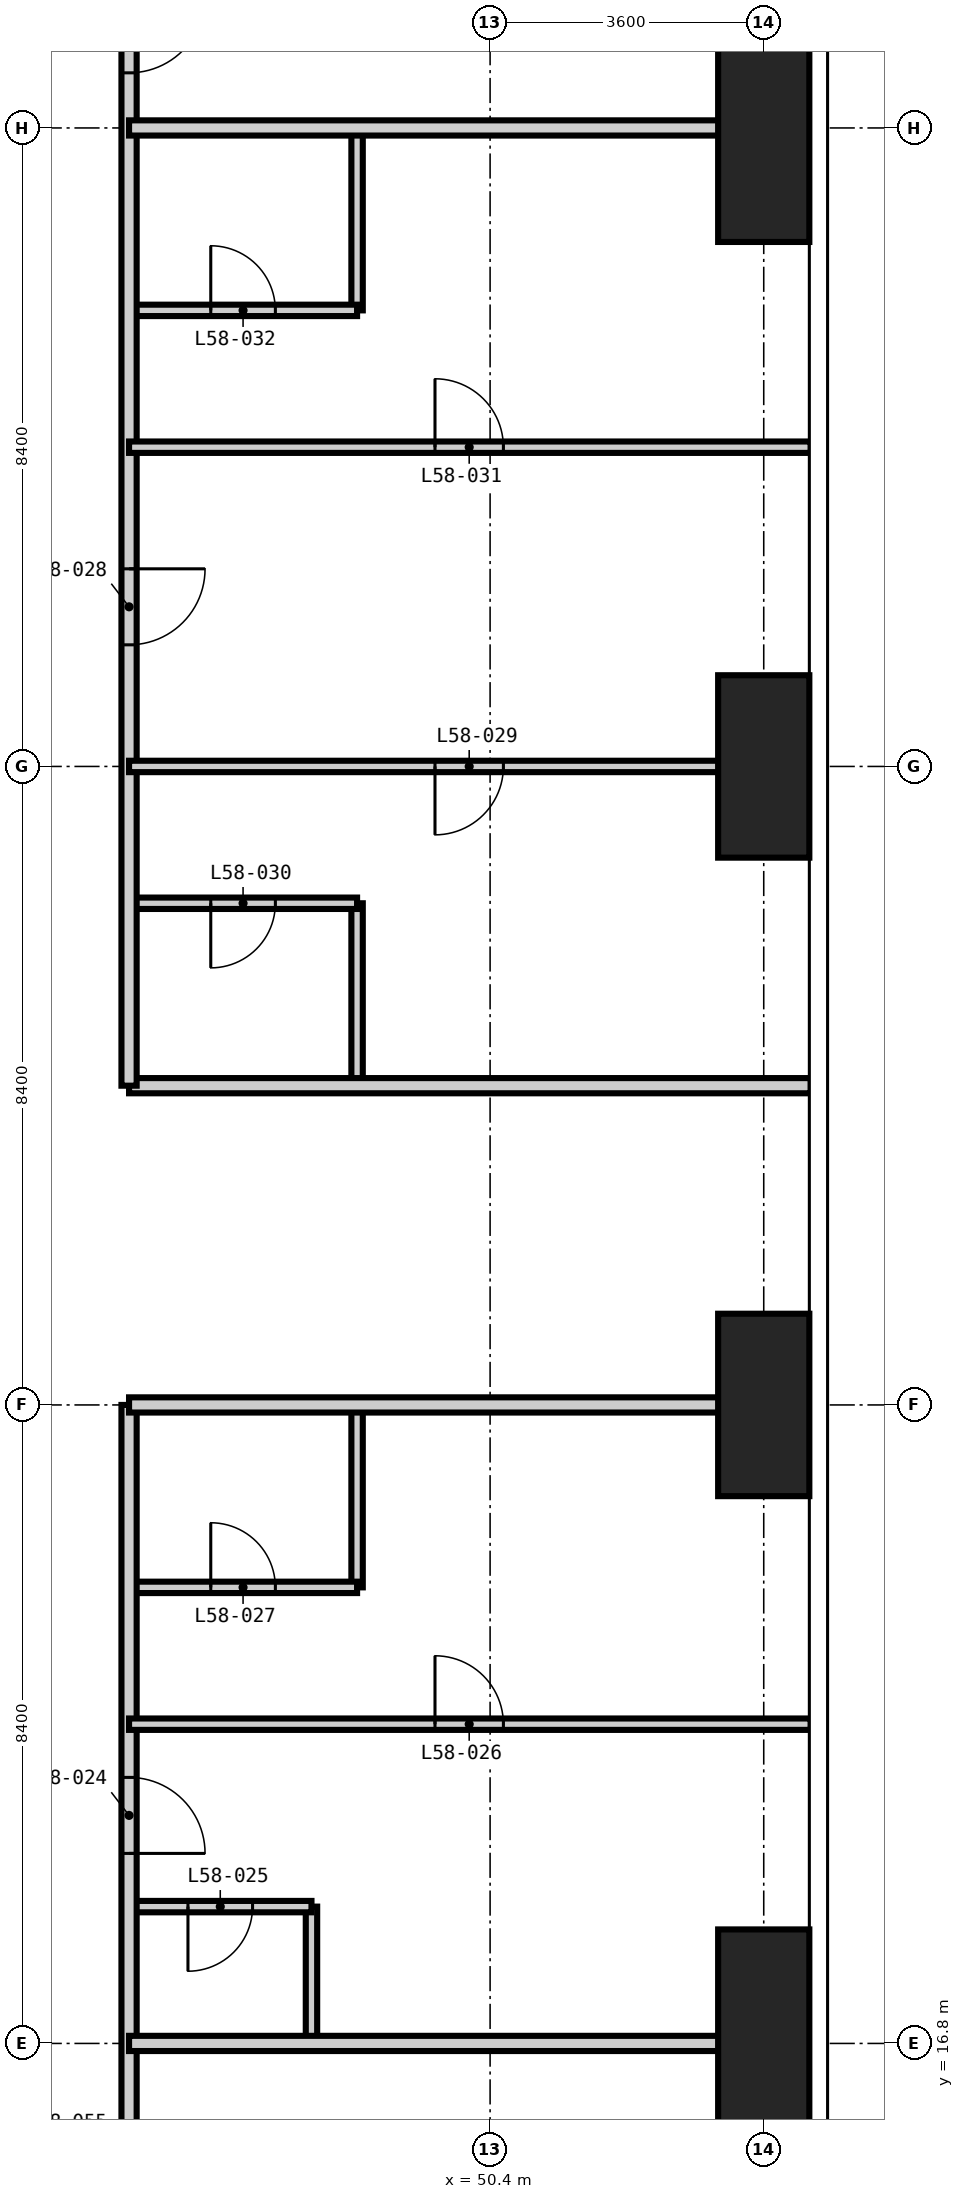
"""IFC4 building model, lengths in metres.
Left out: names, types, materials, properties, quantities, classifications, styles, units other than length and angle.
Written with IfcOpenShell. Run it as: python <this file> out.ifc"""

import sys

from ifc_helpers import new_model, si_unit, direction, frame, frame_2d, origin, origin_2d, place, context, subcontext, project, spatial, rectangle, extrude, element, fill, save


model = new_model("IFC4")
c1 = context("Model", 3, precision=1e-05, world=origin(), true_north=direction((0.0, 1.0)))
c2 = subcontext(c1, "Body", "Model", "MODEL_VIEW")
j1 = project(units=[si_unit("LENGTHUNIT", "METRE"), si_unit("PLANEANGLEUNIT", "RADIAN")], contexts=[c1])
p1 = place(None, origin())
s1 = spatial("IfcSite", under=j1, at=p1, CompositionType="ELEMENT")
p2 = place(p1, origin())
s2 = spatial("IfcBuilding", under=s1, at=p2, CompositionType="ELEMENT")
p3 = place(p2, frame((0.0, 0.0, 225.6)))
s3 = spatial("IfcBuildingStorey", under=s2, at=p3, CompositionType="ELEMENT", Elevation=225.6)
p4 = place(p3, frame((54.0, 16.8, -0.35), z_axis=(0.0, 0.0, 1.0), x_axis=(1.0, 0.0, 0.0)))
e1 = element("IfcColumn", 1, at=p4, inside=s3, PredefinedType="COLUMN", context=c2, shape_type="SweptSolid", body=[
    extrude(rectangle(XDim=1.2, YDim=3.0, at=origin_2d()), origin(), (0.0, 0.0, 1.0), 3.9),
])
for number, where, z_axis, x_axis in (
    (2, (54.0, 25.2, -0.35), (0.0, 0.0, 1.0), (1.0, 0.0, 0.0)),
    (3, (54.0, 33.6, -0.35), (0.0, 0.0, 1.0), (1.0, 0.0, 0.0)),
):
    element("IfcColumn", number, at=place(p3, frame(where, z_axis=z_axis, x_axis=x_axis)), inside=s3, PredefinedType="COLUMN", context=c2, shape_type="SweptSolid", body=[
        extrude(rectangle(XDim=1.2, YDim=2.4, at=origin_2d()), origin(), (0.0, 0.0, 1.0), 3.9),
    ])
p5 = place(p3, frame((54.0, 42.0, -0.35), z_axis=(0.0, 0.0, 1.0), x_axis=(1.0, 0.0, 0.0)))
e4 = element("IfcColumn", 4, at=p5, inside=s3, PredefinedType="COLUMN", context=c2, shape_type="SweptSolid", body=[
    extrude(rectangle(XDim=1.2, YDim=3.0, at=origin_2d()), origin(), (0.0, 0.0, 1.0), 3.9),
])
p6 = place(p3, frame((48.05, 16.8, 0.0), z_axis=(0.0, 0.0, 1.0), x_axis=(0.0, 1.0, 0.0)))
e5 = element("IfcWall", 5, at=p6, inside=s3, PredefinedType="PARTITIONING", context=c2, shape_type="SweptSolid", body=[
    extrude(rectangle(XDim=1.8, YDim=0.15, at=frame_2d((0.9, 0.0))), origin(), (0.0, 0.0, 1.0), 3.55),
])
p7 = place(p3, frame((48.65, 22.8, 0.0), z_axis=(0.0, 0.0, 1.0), x_axis=(0.0, 1.0, 0.0)))
e6 = element("IfcWall", 6, at=p7, inside=s3, PredefinedType="PARTITIONING", context=c2, shape_type="SweptSolid", body=[
    extrude(rectangle(XDim=2.4, YDim=0.15, at=frame_2d((1.2, 0.0))), origin(), (0.0, 0.0, 1.0), 3.55),
])
p8 = place(p3, frame((48.65, 29.4, 0.0), z_axis=(0.0, 0.0, 1.0), x_axis=(0.0, 1.0, 0.0)))
e7 = element("IfcWall", 7, at=p8, inside=s3, PredefinedType="PARTITIONING", context=c2, shape_type="SweptSolid", body=[
    extrude(rectangle(XDim=2.4, YDim=0.15, at=frame_2d((1.2, 0.0))), origin(), (0.0, 0.0, 1.0), 3.55),
])
p9 = place(p3, frame((48.65, 39.6, 0.0), z_axis=(0.0, 0.0, 1.0), x_axis=(0.0, 1.0, 0.0)))
e8 = element("IfcWall", 8, at=p9, inside=s3, PredefinedType="PARTITIONING", context=c2, shape_type="SweptSolid", body=[
    extrude(rectangle(XDim=2.4, YDim=0.15, at=frame_2d((1.2, 0.0))), origin(), (0.0, 0.0, 1.0), 3.55),
])
p10 = place(p3, frame((45.65, 18.6, 0.0), z_axis=(0.0, 0.0, 1.0), x_axis=(1.0, 0.0, 0.0)))
e9 = element("IfcWall", 9, at=p10, inside=s3, PredefinedType="PARTITIONING", context=c2, shape_type="SweptSolid", body=[
    extrude(rectangle(XDim=2.4, YDim=0.15, at=frame_2d((1.2, 0.0))), origin(), (0.0, 0.0, 1.0), 3.55),
])
p11 = place(p10, frame((0.775, 0.0, 0.0)))
e10 = element("IfcOpeningElement", 10, at=p11, cuts=e9, PredefinedType="OPENING", context=c2, shape_type="SweptSolid", body=[
    extrude(rectangle(XDim=0.85, YDim=2.1, at=frame_2d((0.425, 1.05))), frame((0.0, 0.085, 0.0), z_axis=(0.0, -1.0, 0.0), x_axis=(1.0, 0.0, 0.0)), (0.0, 0.0, 1.0), 0.17),
])
p12 = place(p3, frame((45.65, 22.8, 0.0), z_axis=(0.0, 0.0, 1.0), x_axis=(1.0, 0.0, 0.0)))
e11 = element("IfcWall", 11, at=p12, inside=s3, PredefinedType="PARTITIONING", context=c2, shape_type="SweptSolid", body=[
    extrude(rectangle(XDim=3.0, YDim=0.15, at=frame_2d((1.5, 0.0))), origin(), (0.0, 0.0, 1.0), 3.55),
])
p13 = place(p12, frame((1.075, 0.0, 0.0)))
e12 = element("IfcOpeningElement", 12, at=p13, cuts=e11, PredefinedType="OPENING", context=c2, shape_type="SweptSolid", body=[
    extrude(rectangle(XDim=0.85, YDim=2.1, at=frame_2d((0.425, 1.05))), frame((0.0, 0.085, 0.0), z_axis=(0.0, -1.0, 0.0), x_axis=(1.0, 0.0, 0.0)), (0.0, 0.0, 1.0), 0.17),
])
p14 = place(p3, frame((45.65, 31.8, 0.0), z_axis=(0.0, 0.0, 1.0), x_axis=(1.0, 0.0, 0.0)))
e13 = element("IfcWall", 13, at=p14, inside=s3, PredefinedType="PARTITIONING", context=c2, shape_type="SweptSolid", body=[
    extrude(rectangle(XDim=3.0, YDim=0.15, at=frame_2d((1.5, 0.0))), origin(), (0.0, 0.0, 1.0), 3.55),
])
p15 = place(p14, frame((1.075, 0.0, 0.0)))
e14 = element("IfcOpeningElement", 14, at=p15, cuts=e13, PredefinedType="OPENING", context=c2, shape_type="SweptSolid", body=[
    extrude(rectangle(XDim=0.85, YDim=2.1, at=frame_2d((0.425, 1.05))), frame((0.0, 0.085, 0.0), z_axis=(0.0, -1.0, 0.0), x_axis=(1.0, 0.0, 0.0)), (0.0, 0.0, 1.0), 0.17),
])
p16 = place(p3, frame((45.65, 39.6, 0.0), z_axis=(0.0, 0.0, 1.0), x_axis=(1.0, 0.0, 0.0)))
e15 = element("IfcWall", 15, at=p16, inside=s3, PredefinedType="PARTITIONING", context=c2, shape_type="SweptSolid", body=[
    extrude(rectangle(XDim=3.0, YDim=0.15, at=frame_2d((1.5, 0.0))), origin(), (0.0, 0.0, 1.0), 3.55),
])
p17 = place(p16, frame((1.075, 0.0, 0.0)))
e16 = element("IfcOpeningElement", 16, at=p17, cuts=e15, PredefinedType="OPENING", context=c2, shape_type="SweptSolid", body=[
    extrude(rectangle(XDim=0.85, YDim=2.1, at=frame_2d((0.425, 1.05))), frame((0.0, 0.085, 0.0), z_axis=(0.0, -1.0, 0.0), x_axis=(1.0, 0.0, 0.0)), (0.0, 0.0, 1.0), 0.17),
])
p18 = place(p3, frame((45.65, 29.4, 0.0), z_axis=(0.0, 0.0, 1.0), x_axis=(1.0, 0.0, 0.0)))
e17 = element("IfcWall", 17, at=p18, inside=s3, PredefinedType="PARTITIONING", context=c2, shape_type="SweptSolid", body=[
    extrude(rectangle(XDim=8.968, YDim=0.2, at=frame_2d((4.484, 0.0))), origin(), (0.0, 0.0, 1.0), 3.55),
])
p19 = place(p3, frame((45.65, 25.2, 0.0), z_axis=(0.0, 0.0, 1.0), x_axis=(0.0, -1.0, 0.0)))
e18 = element("IfcWall", 18, at=p19, inside=s3, PredefinedType="PARTITIONING", context=c2, shape_type="SweptSolid", body=[
    extrude(rectangle(XDim=11.45, YDim=0.2, at=frame_2d((5.725, 0.0))), origin(), (0.0, 0.0, 1.0), 3.55),
])
p20 = place(p19, frame((4.9, 0.0, 0.0)))
e19 = element("IfcOpeningElement", 19, at=p20, cuts=e18, PredefinedType="OPENING", context=c2, shape_type="SweptSolid", body=[
    extrude(rectangle(XDim=1.0, YDim=2.2, at=frame_2d((0.5, 1.1))), frame((0.0, 0.11, 0.0), z_axis=(0.0, -1.0, 0.0), x_axis=(1.0, 0.0, 0.0)), (0.0, 0.0, 1.0), 0.22),
])
p21 = place(p19, frame((9.425, 0.0, 0.0)))
e20 = element("IfcOpeningElement", 20, at=p21, cuts=e18, PredefinedType="OPENING", context=c2, shape_type="SweptSolid", body=[
    extrude(rectangle(XDim=1.0, YDim=2.2, at=frame_2d((0.5, 1.1))), frame((0.0, 0.11, 0.0), z_axis=(0.0, -1.0, 0.0), x_axis=(1.0, 0.0, 0.0)), (0.0, 0.0, 1.0), 0.22),
])
p22 = place(p3, frame((45.65, 44.45, 0.0), z_axis=(0.0, 0.0, 1.0), x_axis=(0.0, -1.0, 0.0)))
e21 = element("IfcWall", 21, at=p22, inside=s3, PredefinedType="PARTITIONING", context=c2, shape_type="SweptSolid", body=[
    extrude(rectangle(XDim=15.05, YDim=0.2, at=frame_2d((7.525, 0.0))), origin(), (0.0, 0.0, 1.0), 3.55),
])
p23 = place(p22, frame((8.25, 0.0, 0.0)))
e22 = element("IfcOpeningElement", 22, at=p23, cuts=e21, PredefinedType="OPENING", context=c2, shape_type="SweptSolid", body=[
    extrude(rectangle(XDim=1.0, YDim=2.2, at=frame_2d((0.5, 1.1))), frame((0.0, 0.11, 0.0), z_axis=(0.0, -1.0, 0.0), x_axis=(1.0, 0.0, 0.0)), (0.0, 0.0, 1.0), 0.22),
])
p24 = place(p22, frame((0.725, 0.0, 0.0)))
e23 = element("IfcOpeningElement", 23, at=p24, cuts=e21, PredefinedType="OPENING", context=c2, shape_type="SweptSolid", body=[
    extrude(rectangle(XDim=1.0, YDim=2.2, at=frame_2d((0.5, 1.1))), frame((0.0, 0.11, 0.0), z_axis=(0.0, -1.0, 0.0), x_axis=(1.0, 0.0, 0.0)), (0.0, 0.0, 1.0), 0.22),
])
for number, where, z_axis, x_axis in (
    (24, (54.618, 25.2, 0.0), (0.0, 0.0, 1.0), (-1.0, 0.0, 0.0)),
    (25, (45.65, 16.8, 0.0), (0.0, 0.0, 1.0), (1.0, 0.0, 0.0)),
    (26, (45.65, 42.0, 0.0), (0.0, 0.0, 1.0), (1.0, 0.0, 0.0)),
):
    element("IfcWall", number, at=place(p3, frame(where, z_axis=z_axis, x_axis=x_axis)), inside=s3, PredefinedType="PARTITIONING", context=c2, shape_type="SweptSolid", body=[
        extrude(rectangle(XDim=8.968, YDim=0.2, at=frame_2d((4.484, 0.0))), origin(), (0.0, 0.0, 1.0), 3.55),
    ])
p25 = place(p3, frame((45.65, 21.0, 0.0), z_axis=(0.0, 0.0, 1.0), x_axis=(1.0, 0.0, 0.0)))
e27 = element("IfcWall", 27, at=p25, inside=s3, PredefinedType="PARTITIONING", context=c2, shape_type="SweptSolid", body=[
    extrude(rectangle(XDim=8.968, YDim=0.15, at=frame_2d((4.484, 0.0))), origin(), (0.0, 0.0, 1.0), 3.55),
])
p26 = place(p25, frame((4.025, 0.0, 0.0)))
e28 = element("IfcOpeningElement", 28, at=p26, cuts=e27, PredefinedType="OPENING", context=c2, shape_type="SweptSolid", body=[
    extrude(rectangle(XDim=0.9, YDim=2.1, at=frame_2d((0.45, 1.05))), frame((0.0, 0.085, 0.0), z_axis=(0.0, -1.0, 0.0), x_axis=(1.0, 0.0, 0.0)), (0.0, 0.0, 1.0), 0.17),
])
p27 = place(p3, frame((45.65, 33.6, 0.0), z_axis=(0.0, 0.0, 1.0), x_axis=(1.0, 0.0, 0.0)))
e29 = element("IfcWall", 29, at=p27, inside=s3, PredefinedType="PARTITIONING", context=c2, shape_type="SweptSolid", body=[
    extrude(rectangle(XDim=8.968, YDim=0.15, at=frame_2d((4.484, 0.0))), origin(), (0.0, 0.0, 1.0), 3.55),
])
p28 = place(p27, frame((4.025, 0.0, 0.0)))
e30 = element("IfcOpeningElement", 30, at=p28, cuts=e29, PredefinedType="OPENING", context=c2, shape_type="SweptSolid", body=[
    extrude(rectangle(XDim=0.9, YDim=2.1, at=frame_2d((0.45, 1.05))), frame((0.0, 0.085, 0.0), z_axis=(0.0, -1.0, 0.0), x_axis=(1.0, 0.0, 0.0)), (0.0, 0.0, 1.0), 0.17),
])
p29 = place(p3, frame((45.65, 37.8, 0.0), z_axis=(0.0, 0.0, 1.0), x_axis=(1.0, 0.0, 0.0)))
e31 = element("IfcWall", 31, at=p29, inside=s3, PredefinedType="PARTITIONING", context=c2, shape_type="SweptSolid", body=[
    extrude(rectangle(XDim=8.968, YDim=0.15, at=frame_2d((4.484, 0.0))), origin(), (0.0, 0.0, 1.0), 3.55),
])
p30 = place(p29, frame((4.025, 0.0, 0.0)))
e32 = element("IfcOpeningElement", 32, at=p30, cuts=e31, PredefinedType="OPENING", context=c2, shape_type="SweptSolid", body=[
    extrude(rectangle(XDim=0.9, YDim=2.1, at=frame_2d((0.45, 1.05))), frame((0.0, 0.085, 0.0), z_axis=(0.0, -1.0, 0.0), x_axis=(1.0, 0.0, 0.0)), (0.0, 0.0, 1.0), 0.17),
])
p31 = place(p20, origin())
e33 = element("IfcDoor", 33, at=p31, inside=s3, OperationType="SINGLE_SWING_RIGHT", PredefinedType="DOOR", context=c2, shape_type="SweptSolid", body=[
    extrude(rectangle(XDim=1.0, YDim=2.2, at=frame_2d((0.5, 1.1))), frame((0.0, 0.025, 0.0), z_axis=(0.0, -1.0, 0.0), x_axis=(1.0, 0.0, 0.0)), (0.0, 0.0, 1.0), 0.05),
])
fill(e19, e33)
p32 = place(p11, frame((0.85, 0.0, 0.0), z_axis=(0.0, 0.0, 1.0), x_axis=(-1.0, 0.0, 0.0)))
e34 = element("IfcDoor", 34, at=p32, inside=s3, OperationType="SINGLE_SWING_RIGHT", PredefinedType="DOOR", context=c2, shape_type="SweptSolid", body=[
    extrude(rectangle(XDim=0.85, YDim=2.1, at=frame_2d((0.425, 1.05))), frame((0.0, 0.025, 0.0), z_axis=(0.0, -1.0, 0.0), x_axis=(1.0, 0.0, 0.0)), (0.0, 0.0, 1.0), 0.05),
])
fill(e10, e34)
p33 = place(p26, origin())
e35 = element("IfcDoor", 35, at=p33, inside=s3, OperationType="SINGLE_SWING_LEFT", PredefinedType="DOOR", context=c2, shape_type="SweptSolid", body=[
    extrude(rectangle(XDim=0.9, YDim=2.1, at=frame_2d((0.45, 1.05))), frame((0.0, 0.025, 0.0), z_axis=(0.0, -1.0, 0.0), x_axis=(1.0, 0.0, 0.0)), (0.0, 0.0, 1.0), 0.05),
])
fill(e28, e35)
p34 = place(p13, origin())
e36 = element("IfcDoor", 36, at=p34, inside=s3, OperationType="SINGLE_SWING_LEFT", PredefinedType="DOOR", context=c2, shape_type="SweptSolid", body=[
    extrude(rectangle(XDim=0.85, YDim=2.1, at=frame_2d((0.425, 1.05))), frame((0.0, 0.025, 0.0), z_axis=(0.0, -1.0, 0.0), x_axis=(1.0, 0.0, 0.0)), (0.0, 0.0, 1.0), 0.05),
])
fill(e12, e36)
p35 = place(p23, origin())
e37 = element("IfcDoor", 37, at=p35, inside=s3, OperationType="SINGLE_SWING_LEFT", PredefinedType="DOOR", context=c2, shape_type="SweptSolid", body=[
    extrude(rectangle(XDim=1.0, YDim=2.2, at=frame_2d((0.5, 1.1))), frame((0.0, 0.025, 0.0), z_axis=(0.0, -1.0, 0.0), x_axis=(1.0, 0.0, 0.0)), (0.0, 0.0, 1.0), 0.05),
])
fill(e22, e37)
p36 = place(p28, frame((0.9, 0.0, 0.0), z_axis=(0.0, 0.0, 1.0), x_axis=(-1.0, 0.0, 0.0)))
e38 = element("IfcDoor", 38, at=p36, inside=s3, OperationType="SINGLE_SWING_RIGHT", PredefinedType="DOOR", context=c2, shape_type="SweptSolid", body=[
    extrude(rectangle(XDim=0.9, YDim=2.1, at=frame_2d((0.45, 1.05))), frame((0.0, 0.025, 0.0), z_axis=(0.0, -1.0, 0.0), x_axis=(1.0, 0.0, 0.0)), (0.0, 0.0, 1.0), 0.05),
])
fill(e30, e38)
p37 = place(p15, frame((0.85, 0.0, 0.0), z_axis=(0.0, 0.0, 1.0), x_axis=(-1.0, 0.0, 0.0)))
e39 = element("IfcDoor", 39, at=p37, inside=s3, OperationType="SINGLE_SWING_RIGHT", PredefinedType="DOOR", context=c2, shape_type="SweptSolid", body=[
    extrude(rectangle(XDim=0.85, YDim=2.1, at=frame_2d((0.425, 1.05))), frame((0.0, 0.025, 0.0), z_axis=(0.0, -1.0, 0.0), x_axis=(1.0, 0.0, 0.0)), (0.0, 0.0, 1.0), 0.05),
])
fill(e14, e39)
p38 = place(p30, origin())
e40 = element("IfcDoor", 40, at=p38, inside=s3, OperationType="SINGLE_SWING_LEFT", PredefinedType="DOOR", context=c2, shape_type="SweptSolid", body=[
    extrude(rectangle(XDim=0.9, YDim=2.1, at=frame_2d((0.45, 1.05))), frame((0.0, 0.025, 0.0), z_axis=(0.0, -1.0, 0.0), x_axis=(1.0, 0.0, 0.0)), (0.0, 0.0, 1.0), 0.05),
])
fill(e32, e40)
p39 = place(p17, origin())
e41 = element("IfcDoor", 41, at=p39, inside=s3, OperationType="SINGLE_SWING_LEFT", PredefinedType="DOOR", context=c2, shape_type="SweptSolid", body=[
    extrude(rectangle(XDim=0.85, YDim=2.1, at=frame_2d((0.425, 1.05))), frame((0.0, 0.025, 0.0), z_axis=(0.0, -1.0, 0.0), x_axis=(1.0, 0.0, 0.0)), (0.0, 0.0, 1.0), 0.05),
])
fill(e16, e41)
p40 = place(p24, origin())
e42 = element("IfcDoor", 42, at=p40, inside=s3, OperationType="SINGLE_SWING_LEFT", PredefinedType="DOOR", context=c2, shape_type="SweptSolid", body=[
    extrude(rectangle(XDim=1.0, YDim=2.2, at=frame_2d((0.5, 1.1))), frame((0.0, 0.025, 0.0), z_axis=(0.0, -1.0, 0.0), x_axis=(1.0, 0.0, 0.0)), (0.0, 0.0, 1.0), 0.05),
])
fill(e23, e42)
save(model, sys.argv[1])
